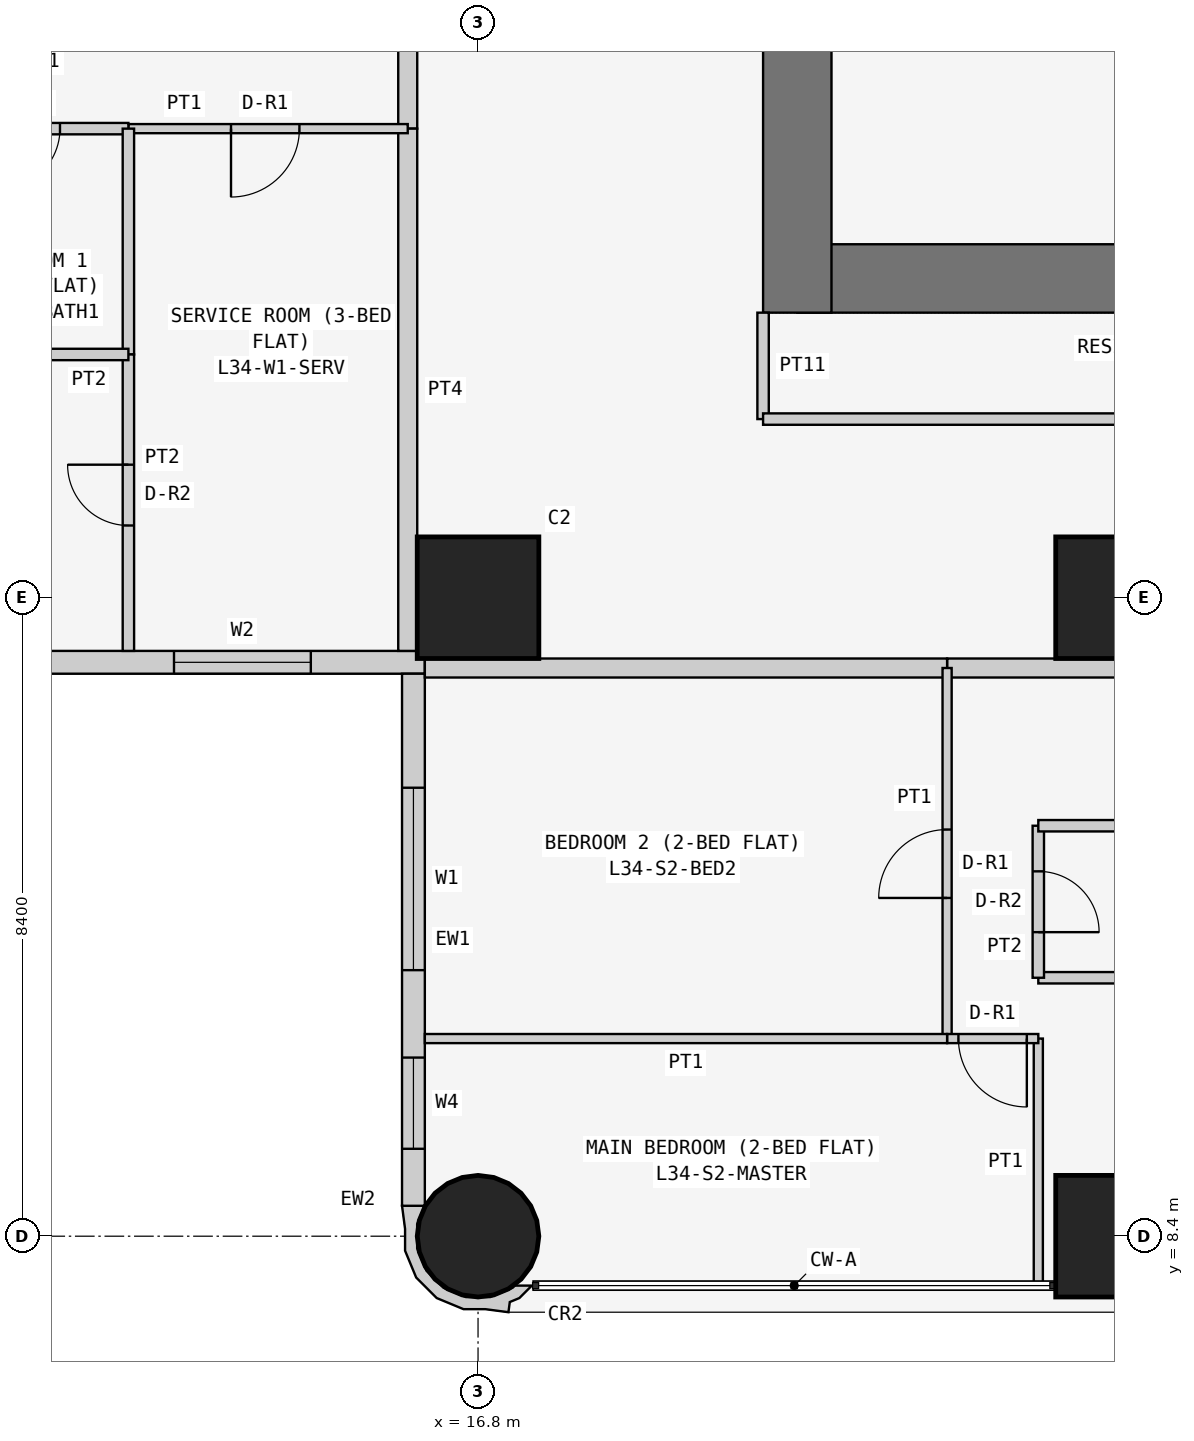
"""IFC4 building model, lengths in metres.
Left out: names, types, materials, properties, quantities, classifications, styles, units other than length and angle.
Written with IfcOpenShell. Run it as: python <this file> out.ifc"""

import sys

from ifc_helpers import new_model, si_unit, direction, frame, frame_2d, origin, origin_2d, place, context, subcontext, project, spatial, polyline, rectangle, circle, outline, extrude, element, fill, save


model = new_model("IFC4")
c1 = context("Model", 3, precision=1e-05, world=origin(), true_north=direction((0.0, 1.0)))
c2 = subcontext(c1, "Body", "Model", "MODEL_VIEW")
j1 = project(units=[si_unit("LENGTHUNIT", "METRE"), si_unit("PLANEANGLEUNIT", "RADIAN")], contexts=[c1])
p1 = place(None, origin())
s1 = spatial("IfcSite", under=j1, at=p1, CompositionType="ELEMENT")
p2 = place(p1, origin())
s2 = spatial("IfcBuilding", under=s1, at=p2, CompositionType="ELEMENT")
p3 = place(p2, frame((0.0, 0.0, 134.1)))
s3 = spatial("IfcBuildingStorey", under=s2, at=p3, CompositionType="ELEMENT", Elevation=134.1)
p4 = place(p3, frame((16.8, 8.4, 0.0), z_axis=(0.0, 0.0, 1.0), x_axis=(1.0, 0.0, 0.0)))
e1 = element("IfcColumn", 1, at=p4, inside=s3, PredefinedType="COLUMN", context=c2, shape_type="SweptSolid", body=[
    extrude(circle(Radius=0.8, at=origin_2d()), origin(), (0.0, 0.0, 1.0), 3.6),
])
for number, where, z_axis, x_axis in (
    (2, (16.8, 16.8, 0.0), (0.0, 0.0, 1.0), (1.0, 0.0, 0.0)),
    (3, (25.2, 8.4, 0.0), (0.0, 0.0, 1.0), (1.0, 0.0, 0.0)),
    (4, (25.2, 16.8, 0.0), (0.0, 0.0, 1.0), (1.0, 0.0, 0.0)),
):
    element("IfcColumn", number, at=place(p3, frame(where, z_axis=z_axis, x_axis=x_axis)), inside=s3, PredefinedType="COLUMN", context=c2, shape_type="SweptSolid", body=[
        extrude(rectangle(XDim=1.6, YDim=1.6, at=origin_2d()), origin(), (0.0, 0.0, 1.0), 3.6),
    ])
p5 = place(p3, frame((21.0, 21.0, 0.0), z_axis=(0.0, 0.0, 1.0), x_axis=(1.0, 0.0, 0.0)))
e5 = element("IfcWall", 5, at=p5, inside=s3, PredefinedType="SHEAR", context=c2, shape_type="SweptSolid", body=[
    extrude(rectangle(XDim=17.25, YDim=0.9, at=frame_2d((8.625, 0.0))), origin(), (0.0, 0.0, 1.0), 3.6),
])
p6 = place(p3, frame((21.0, 37.8, 0.0), z_axis=(0.0, 0.0, 1.0), x_axis=(0.0, -1.0, 0.0)))
e6 = element("IfcWall", 6, at=p6, inside=s3, PredefinedType="SHEAR", context=c2, shape_type="SweptSolid", body=[
    extrude(rectangle(XDim=17.25, YDim=0.9, at=frame_2d((8.625, 0.0))), origin(), (0.0, 0.0, 1.0), 3.6),
])
p7 = place(p6, frame((5.4, 0.0, 0.0)))
e7 = element("IfcOpeningElement", 7, at=p7, cuts=e6, PredefinedType="OPENING", context=c2, shape_type="SweptSolid", body=[
    extrude(rectangle(XDim=1.2, YDim=2.1, at=frame_2d((0.6, 1.05))), frame((0.0, 0.46, 0.0), z_axis=(0.0, -1.0, 0.0), x_axis=(1.0, 0.0, 0.0)), (0.0, 0.0, 1.0), 0.92),
])
p8 = place(p3, frame((0.4, 15.95, 0.0), z_axis=(0.0, 0.0, 1.0), x_axis=(1.0, 0.0, 0.0)))
e8 = element("IfcWall", 8, at=p8, inside=s3, PredefinedType="SOLIDWALL", context=c2, shape_type="SweptSolid", body=[
    extrude(rectangle(XDim=15.7, YDim=0.3, at=frame_2d((7.85, 0.0))), origin(), (0.0, 0.0, 1.0), 3.45),
])
p9 = place(p8, frame((12.4, 0.0, 0.9)))
e9 = element("IfcOpeningElement", 9, at=p9, cuts=e8, PredefinedType="OPENING", context=c2, shape_type="SweptSolid", body=[
    extrude(rectangle(XDim=1.8, YDim=1.5, at=frame_2d((0.9, 0.75))), frame((0.0, 0.16, 0.0), z_axis=(0.0, -1.0, 0.0), x_axis=(1.0, 0.0, 0.0)), (0.0, 0.0, 1.0), 0.32),
])
p10 = place(p8, frame((9.55, 0.0, 1.5)))
e10 = element("IfcOpeningElement", 10, at=p10, cuts=e8, PredefinedType="OPENING", context=c2, shape_type="SweptSolid", body=[
    extrude(rectangle(XDim=0.9, YDim=0.7, at=frame_2d((0.45, 0.35))), frame((0.0, 0.16, 0.0), z_axis=(0.0, -1.0, 0.0), x_axis=(1.0, 0.0, 0.0)), (0.0, 0.0, 1.0), 0.32),
])
p11 = place(p8, frame((5.1, 0.0, 0.9)))
e11 = element("IfcOpeningElement", 11, at=p11, cuts=e8, PredefinedType="OPENING", context=c2, shape_type="SweptSolid", body=[
    extrude(rectangle(XDim=1.8, YDim=1.5, at=frame_2d((0.9, 0.75))), frame((0.0, 0.16, 0.0), z_axis=(0.0, -1.0, 0.0), x_axis=(1.0, 0.0, 0.0)), (0.0, 0.0, 1.0), 0.32),
])
p12 = place(p8, frame((2.0, 0.0, 0.0)))
e12 = element("IfcOpeningElement", 12, at=p12, cuts=e8, PredefinedType="OPENING", context=c2, shape_type="SweptSolid", body=[
    extrude(rectangle(XDim=0.9, YDim=2.4, at=frame_2d((0.45, 1.2))), frame((0.0, 0.16, 0.0), z_axis=(0.0, -1.0, 0.0), x_axis=(1.0, 0.0, 0.0)), (0.0, 0.0, 1.0), 0.32),
])
p13 = place(p8, frame((0.7, 0.0, 0.9)))
e13 = element("IfcOpeningElement", 13, at=p13, cuts=e8, PredefinedType="OPENING", context=c2, shape_type="SweptSolid", body=[
    extrude(rectangle(XDim=1.2, YDim=1.5, at=frame_2d((0.6, 0.75))), frame((0.0, 0.16, 0.0), z_axis=(0.0, -1.0, 0.0), x_axis=(1.0, 0.0, 0.0)), (0.0, 0.0, 1.0), 0.32),
])
p14 = place(p3, frame((15.95, 15.8, 0.0), z_axis=(0.0, 0.0, 1.0), x_axis=(0.0, -1.0, 0.0)))
e14 = element("IfcWall", 14, at=p14, inside=s3, PredefinedType="SOLIDWALL", context=c2, shape_type="SweptSolid", body=[
    extrude(rectangle(XDim=7.0, YDim=0.3, at=frame_2d((3.5, 0.0))), origin(), (0.0, 0.0, 1.0), 3.45),
])
p15 = place(p14, frame((1.5, 0.0, 0.9)))
e15 = element("IfcOpeningElement", 15, at=p15, cuts=e14, PredefinedType="OPENING", context=c2, shape_type="SweptSolid", body=[
    extrude(rectangle(XDim=2.4, YDim=1.5, at=frame_2d((1.2, 0.75))), frame((0.0, 0.16, 0.0), z_axis=(0.0, -1.0, 0.0), x_axis=(1.0, 0.0, 0.0)), (0.0, 0.0, 1.0), 0.32),
])
p16 = place(p14, frame((5.05, 0.0, 0.9)))
e16 = element("IfcOpeningElement", 16, at=p16, cuts=e14, PredefinedType="OPENING", context=c2, shape_type="SweptSolid", body=[
    extrude(rectangle(XDim=1.2, YDim=1.5, at=frame_2d((0.6, 0.75))), frame((0.0, 0.16, 0.0), z_axis=(0.0, -1.0, 0.0), x_axis=(1.0, 0.0, 0.0)), (0.0, 0.0, 1.0), 0.32),
])
p17 = place(p3, frame((15.983, 8.727, 0.0), z_axis=(0.0, 0.0, 1.0), x_axis=(-0.343276641956, -0.93923434088, 0.0)))
e17 = element("IfcWall", 17, at=p17, inside=s3, PredefinedType="SOLIDWALL", context=c2, shape_type="SweptSolid", body=[
    extrude(outline(polyline([(0.829, 1.599), (0.697, 1.569), (0.604, 1.67), (0.394, 1.767), (0.471, 1.556), (0.509, 1.539), (0.724, 1.304), (0.833, 1.005), (0.82, 0.686), (0.686, 0.397), (0.451, 0.182), (0.152, 0.073), (-0.116, 0.084), (-0.127, 0.078), (-0.146, 0.071), (-0.006, -0.197), (0.266, -0.055), (0.535, 0.044), (0.817, 0.302), (0.978, 0.648), (0.994, 1.03), (0.895, 1.3), (0.829, 1.599)])), origin(), (0.0, 0.0, 1.0), 3.45),
])
p18 = place(p3, frame((20.55, 20.55, 0.0), z_axis=(0.0, 0.0, 1.0), x_axis=(0.0, -1.0, 0.0)))
e18 = element("IfcWall", 18, at=p18, inside=s3, PredefinedType="PARTITIONING", context=c2, shape_type="SweptSolid", body=[
    extrude(rectangle(XDim=1.4, YDim=0.15, at=frame_2d((0.7, 0.0))), origin(), (0.0, 0.0, 1.0), 3.45),
])
p19 = place(p3, frame((20.55, 19.15, 0.0), z_axis=(0.0, 0.0, 1.0), x_axis=(1.0, 0.0, 0.0)))
e19 = element("IfcWall", 19, at=p19, inside=s3, PredefinedType="PARTITIONING", context=c2, shape_type="SweptSolid", body=[
    extrude(rectangle(XDim=11.95, YDim=0.15, at=frame_2d((5.975, 0.0))), origin(), (0.0, 0.0, 1.0), 3.45),
])
p20 = place(p19, frame((8.35, 0.0, 0.0)))
e20 = element("IfcOpeningElement", 20, at=p20, cuts=e19, PredefinedType="OPENING", context=c2, shape_type="SweptSolid", body=[
    extrude(rectangle(XDim=1.0, YDim=2.1, at=frame_2d((0.5, 1.05))), frame((0.0, 0.085, 0.0), z_axis=(0.0, -1.0, 0.0), x_axis=(1.0, 0.0, 0.0)), (0.0, 0.0, 1.0), 0.17),
])
p21 = place(p3, frame((29.4, 15.875, 0.0), z_axis=(0.0, 0.0, 1.0), x_axis=(-1.0, 0.0, 0.0)))
e21 = element("IfcWall", 21, at=p21, inside=s3, PredefinedType="PARTITIONING", context=c2, shape_type="SweptSolid", body=[
    extrude(rectangle(XDim=6.429, YDim=0.25, at=frame_2d((3.214, 0.0))), origin(), (0.0, 0.0, 1.0), 3.45),
])
p22 = place(p21, frame((0.5, 0.0, 0.0)))
e22 = element("IfcOpeningElement", 22, at=p22, cuts=e21, PredefinedType="OPENING", context=c2, shape_type="SweptSolid", body=[
    extrude(rectangle(XDim=1.0, YDim=2.1, at=frame_2d((0.5, 1.05))), frame((0.0, 0.135, 0.0), z_axis=(0.0, -1.0, 0.0), x_axis=(1.0, 0.0, 0.0)), (0.0, 0.0, 1.0), 0.27),
])
p23 = place(p3, frame((22.971, 15.875, 0.0), z_axis=(0.0, 0.0, 1.0), x_axis=(-1.0, 0.0, 0.0)))
e23 = element("IfcWall", 23, at=p23, inside=s3, PredefinedType="PARTITIONING", context=c2, shape_type="SweptSolid", body=[
    extrude(rectangle(XDim=6.871, YDim=0.25, at=frame_2d((3.436, 0.0))), origin(), (0.0, 0.0, 1.0), 3.45),
])
p24 = place(p3, frame((15.875, 22.971, 0.0), z_axis=(0.0, 0.0, 1.0), x_axis=(0.0, 1.0, 0.0)))
e24 = element("IfcWall", 24, at=p24, inside=s3, PredefinedType="PARTITIONING", context=c2, shape_type="SweptSolid", body=[
    extrude(rectangle(XDim=1.2, YDim=0.25, at=frame_2d((0.6, 0.0))), origin(), (0.0, 0.0, 1.0), 3.45),
])
p25 = place(p3, frame((15.875, 16.1, 0.0), z_axis=(0.0, 0.0, 1.0), x_axis=(0.0, 1.0, 0.0)))
e25 = element("IfcWall", 25, at=p25, inside=s3, PredefinedType="PARTITIONING", context=c2, shape_type="SweptSolid", body=[
    extrude(rectangle(XDim=6.871, YDim=0.25, at=frame_2d((3.436, 0.0))), origin(), (0.0, 0.0, 1.0), 3.45),
])
p26 = place(p3, frame((29.4, 11.8, 0.0), z_axis=(0.0, 0.0, 1.0), x_axis=(-1.0, 0.0, 0.0)))
e26 = element("IfcWall", 26, at=p26, inside=s3, PredefinedType="PARTITIONING", context=c2, shape_type="SweptSolid", body=[
    extrude(rectangle(XDim=5.229, YDim=0.15, at=frame_2d((2.615, 0.0))), origin(), (0.0, 0.0, 1.0), 3.45),
])
p27 = place(p3, frame((24.171, 11.8, 0.0), z_axis=(0.0, 0.0, 1.0), x_axis=(0.0, 1.0, 0.0)))
e27 = element("IfcWall", 27, at=p27, inside=s3, PredefinedType="PARTITIONING", context=c2, shape_type="SweptSolid", body=[
    extrude(rectangle(XDim=2.0, YDim=0.15, at=frame_2d((1.0, 0.0))), origin(), (0.0, 0.0, 1.0), 3.45),
])
p28 = place(p27, frame((0.6, 0.0, 0.0)))
e28 = element("IfcOpeningElement", 28, at=p28, cuts=e27, PredefinedType="OPENING", context=c2, shape_type="SweptSolid", body=[
    extrude(rectangle(XDim=0.8, YDim=2.1, at=frame_2d((0.4, 1.05))), frame((0.0, 0.085, 0.0), z_axis=(0.0, -1.0, 0.0), x_axis=(1.0, 0.0, 0.0)), (0.0, 0.0, 1.0), 0.17),
])
p29 = place(p3, frame((24.171, 13.8, 0.0), z_axis=(0.0, 0.0, 1.0), x_axis=(1.0, 0.0, 0.0)))
e29 = element("IfcWall", 29, at=p29, inside=s3, PredefinedType="PARTITIONING", context=c2, shape_type="SweptSolid", body=[
    extrude(rectangle(XDim=5.229, YDim=0.15, at=frame_2d((2.615, 0.0))), origin(), (0.0, 0.0, 1.0), 3.45),
])
p30 = place(p3, frame((22.971, 11.0, 0.0), z_axis=(0.0, 0.0, 1.0), x_axis=(0.0, 1.0, 0.0)))
e30 = element("IfcWall", 30, at=p30, inside=s3, PredefinedType="PARTITIONING", context=c2, shape_type="SweptSolid", body=[
    extrude(rectangle(XDim=4.875, YDim=0.12, at=frame_2d((2.438, 0.0))), origin(), (0.0, 0.0, 1.0), 3.45),
])
p31 = place(p30, frame((1.85, 0.0, 0.0)))
e31 = element("IfcOpeningElement", 31, at=p31, cuts=e30, PredefinedType="OPENING", context=c2, shape_type="SweptSolid", body=[
    extrude(rectangle(XDim=0.9, YDim=2.1, at=frame_2d((0.45, 1.05))), frame((0.0, 0.07, 0.0), z_axis=(0.0, -1.0, 0.0), x_axis=(1.0, 0.0, 0.0)), (0.0, 0.0, 1.0), 0.14),
])
p32 = place(p3, frame((24.171, 7.75, 0.0), z_axis=(0.0, 0.0, 1.0), x_axis=(0.0, 1.0, 0.0)))
e32 = element("IfcWall", 32, at=p32, inside=s3, PredefinedType="PARTITIONING", context=c2, shape_type="SweptSolid", body=[
    extrude(rectangle(XDim=3.25, YDim=0.12, at=frame_2d((1.625, 0.0))), origin(), (0.0, 0.0, 1.0), 3.45),
])
p33 = place(p3, frame((24.171, 11.0, 0.0), z_axis=(0.0, 0.0, 1.0), x_axis=(-1.0, 0.0, 0.0)))
e33 = element("IfcWall", 33, at=p33, inside=s3, PredefinedType="PARTITIONING", context=c2, shape_type="SweptSolid", body=[
    extrude(rectangle(XDim=1.2, YDim=0.12, at=frame_2d((0.6, 0.0))), origin(), (0.0, 0.0, 1.0), 3.45),
])
p34 = place(p33, frame((0.151, 0.0, 0.0)))
e34 = element("IfcOpeningElement", 34, at=p34, cuts=e33, PredefinedType="OPENING", context=c2, shape_type="SweptSolid", body=[
    extrude(rectangle(XDim=0.9, YDim=2.1, at=frame_2d((0.45, 1.05))), frame((0.0, 0.07, 0.0), z_axis=(0.0, -1.0, 0.0), x_axis=(1.0, 0.0, 0.0)), (0.0, 0.0, 1.0), 0.14),
])
p35 = place(p3, frame((22.971, 11.0, 0.0), z_axis=(0.0, 0.0, 1.0), x_axis=(-1.0, 0.0, 0.0)))
e35 = element("IfcWall", 35, at=p35, inside=s3, PredefinedType="PARTITIONING", context=c2, shape_type="SweptSolid", body=[
    extrude(rectangle(XDim=6.871, YDim=0.12, at=frame_2d((3.436, 0.0))), origin(), (0.0, 0.0, 1.0), 3.45),
])
p36 = place(p3, frame((12.2, 22.971, 0.0), z_axis=(0.0, 0.0, 1.0), x_axis=(1.0, 0.0, 0.0)))
e36 = element("IfcWall", 36, at=p36, inside=s3, PredefinedType="PARTITIONING", context=c2, shape_type="SweptSolid", body=[
    extrude(rectangle(XDim=3.675, YDim=0.12, at=frame_2d((1.837, 0.0))), origin(), (0.0, 0.0, 1.0), 3.45),
])
p37 = place(p36, frame((1.35, 0.0, 0.0)))
e37 = element("IfcOpeningElement", 37, at=p37, cuts=e36, PredefinedType="OPENING", context=c2, shape_type="SweptSolid", body=[
    extrude(rectangle(XDim=0.9, YDim=2.1, at=frame_2d((0.45, 1.05))), frame((0.0, 0.07, 0.0), z_axis=(0.0, -1.0, 0.0), x_axis=(1.0, 0.0, 0.0)), (0.0, 0.0, 1.0), 0.14),
])
p38 = place(p3, frame((9.6, 22.971, 0.0), z_axis=(0.0, 0.0, 1.0), x_axis=(1.0, 0.0, 0.0)))
e38 = element("IfcWall", 38, at=p38, inside=s3, PredefinedType="PARTITIONING", context=c2, shape_type="SweptSolid", body=[
    extrude(rectangle(XDim=2.6, YDim=0.15, at=frame_2d((1.3, 0.0))), origin(), (0.0, 0.0, 1.0), 3.45),
])
p39 = place(p38, frame((0.9, 0.0, 0.0)))
e39 = element("IfcOpeningElement", 39, at=p39, cuts=e38, PredefinedType="OPENING", context=c2, shape_type="SweptSolid", body=[
    extrude(rectangle(XDim=0.8, YDim=2.1, at=frame_2d((0.4, 1.05))), frame((0.0, 0.085, 0.0), z_axis=(0.0, -1.0, 0.0), x_axis=(1.0, 0.0, 0.0)), (0.0, 0.0, 1.0), 0.17),
])
p40 = place(p3, frame((12.2, 22.971, 0.0), z_axis=(0.0, 0.0, 1.0), x_axis=(0.0, -1.0, 0.0)))
e40 = element("IfcWall", 40, at=p40, inside=s3, PredefinedType="PARTITIONING", context=c2, shape_type="SweptSolid", body=[
    extrude(rectangle(XDim=2.971, YDim=0.15, at=frame_2d((1.485, 0.0))), origin(), (0.0, 0.0, 1.0), 3.45),
])
p41 = place(p3, frame((12.2, 20.0, 0.0), z_axis=(0.0, 0.0, 1.0), x_axis=(0.0, -1.0, 0.0)))
e41 = element("IfcWall", 41, at=p41, inside=s3, PredefinedType="PARTITIONING", context=c2, shape_type="SweptSolid", body=[
    extrude(rectangle(XDim=3.9, YDim=0.15, at=frame_2d((1.95, 0.0))), origin(), (0.0, 0.0, 1.0), 3.45),
])
p42 = place(p41, frame((1.45, 0.0, 0.0)))
e42 = element("IfcOpeningElement", 42, at=p42, cuts=e41, PredefinedType="OPENING", context=c2, shape_type="SweptSolid", body=[
    extrude(rectangle(XDim=0.8, YDim=2.1, at=frame_2d((0.4, 1.05))), frame((0.0, 0.085, 0.0), z_axis=(0.0, -1.0, 0.0), x_axis=(1.0, 0.0, 0.0)), (0.0, 0.0, 1.0), 0.17),
])
p43 = place(p3, frame((9.6, 20.0, 0.0), z_axis=(0.0, 0.0, 1.0), x_axis=(1.0, 0.0, 0.0)))
e43 = element("IfcWall", 43, at=p43, inside=s3, PredefinedType="PARTITIONING", context=c2, shape_type="SweptSolid", body=[
    extrude(rectangle(XDim=2.6, YDim=0.15, at=frame_2d((1.3, 0.0))), origin(), (0.0, 0.0, 1.0), 3.45),
])
p44 = place(p15, origin())
e44 = element("IfcWindow", 44, at=p44, inside=s3, PartitioningType="SINGLE_PANEL", PredefinedType="WINDOW", context=c2, shape_type="SweptSolid", body=[
    extrude(rectangle(XDim=2.4, YDim=1.5, at=frame_2d((1.2, 0.75))), frame((0.0, 0.03, 0.0), z_axis=(0.0, -1.0, 0.0), x_axis=(1.0, 0.0, 0.0)), (0.0, 0.0, 1.0), 0.06),
])
fill(e15, e44)
p45 = place(p16, origin())
e45 = element("IfcWindow", 45, at=p45, inside=s3, PartitioningType="SINGLE_PANEL", PredefinedType="WINDOW", context=c2, shape_type="SweptSolid", body=[
    extrude(rectangle(XDim=1.2, YDim=1.5, at=frame_2d((0.6, 0.75))), frame((0.0, 0.03, 0.0), z_axis=(0.0, -1.0, 0.0), x_axis=(1.0, 0.0, 0.0)), (0.0, 0.0, 1.0), 0.06),
])
fill(e16, e45)
p46 = place(p9, origin())
e46 = element("IfcWindow", 46, at=p46, inside=s3, PartitioningType="SINGLE_PANEL", PredefinedType="WINDOW", context=c2, shape_type="SweptSolid", body=[
    extrude(rectangle(XDim=1.8, YDim=1.5, at=frame_2d((0.9, 0.75))), frame((0.0, 0.03, 0.0), z_axis=(0.0, -1.0, 0.0), x_axis=(1.0, 0.0, 0.0)), (0.0, 0.0, 1.0), 0.06),
])
fill(e9, e46)
p47 = place(p28, frame((0.8, 0.0, 0.0), z_axis=(0.0, 0.0, 1.0), x_axis=(-1.0, 0.0, 0.0)))
e47 = element("IfcDoor", 47, at=p47, inside=s3, OperationType="SINGLE_SWING_RIGHT", PredefinedType="DOOR", context=c2, shape_type="SweptSolid", body=[
    extrude(rectangle(XDim=0.8, YDim=2.1, at=frame_2d((0.4, 1.05))), frame((0.0, 0.025, 0.0), z_axis=(0.0, -1.0, 0.0), x_axis=(1.0, 0.0, 0.0)), (0.0, 0.0, 1.0), 0.05),
])
fill(e28, e47)
p48 = place(p31, origin())
e48 = element("IfcDoor", 48, at=p48, inside=s3, OperationType="SINGLE_SWING_LEFT", PredefinedType="DOOR", context=c2, shape_type="SweptSolid", body=[
    extrude(rectangle(XDim=0.9, YDim=2.1, at=frame_2d((0.45, 1.05))), frame((0.0, 0.025, 0.0), z_axis=(0.0, -1.0, 0.0), x_axis=(1.0, 0.0, 0.0)), (0.0, 0.0, 1.0), 0.05),
])
fill(e31, e48)
p49 = place(p34, origin())
e49 = element("IfcDoor", 49, at=p49, inside=s3, OperationType="SINGLE_SWING_LEFT", PredefinedType="DOOR", context=c2, shape_type="SweptSolid", body=[
    extrude(rectangle(XDim=0.9, YDim=2.1, at=frame_2d((0.45, 1.05))), frame((0.0, 0.025, 0.0), z_axis=(0.0, -1.0, 0.0), x_axis=(1.0, 0.0, 0.0)), (0.0, 0.0, 1.0), 0.05),
])
fill(e34, e49)
p50 = place(p37, frame((0.9, 0.0, 0.0), z_axis=(0.0, 0.0, 1.0), x_axis=(-1.0, 0.0, 0.0)))
e50 = element("IfcDoor", 50, at=p50, inside=s3, OperationType="SINGLE_SWING_RIGHT", PredefinedType="DOOR", context=c2, shape_type="SweptSolid", body=[
    extrude(rectangle(XDim=0.9, YDim=2.1, at=frame_2d((0.45, 1.05))), frame((0.0, 0.025, 0.0), z_axis=(0.0, -1.0, 0.0), x_axis=(1.0, 0.0, 0.0)), (0.0, 0.0, 1.0), 0.05),
])
fill(e37, e50)
p51 = place(p42, frame((0.8, 0.0, 0.0), z_axis=(0.0, 0.0, 1.0), x_axis=(-1.0, 0.0, 0.0)))
e51 = element("IfcDoor", 51, at=p51, inside=s3, OperationType="SINGLE_SWING_RIGHT", PredefinedType="DOOR", context=c2, shape_type="SweptSolid", body=[
    extrude(rectangle(XDim=0.8, YDim=2.1, at=frame_2d((0.4, 1.05))), frame((0.0, 0.025, 0.0), z_axis=(0.0, -1.0, 0.0), x_axis=(1.0, 0.0, 0.0)), (0.0, 0.0, 1.0), 0.05),
])
fill(e42, e51)
p52 = place(p39, frame((0.8, 0.0, 0.0), z_axis=(0.0, 0.0, 1.0), x_axis=(-1.0, 0.0, 0.0)))
e52 = element("IfcDoor", 52, at=p52, inside=s3, OperationType="SINGLE_SWING_RIGHT", PredefinedType="DOOR", context=c2, shape_type="SweptSolid", body=[
    extrude(rectangle(XDim=0.8, YDim=2.1, at=frame_2d((0.4, 1.05))), frame((0.0, 0.025, 0.0), z_axis=(0.0, -1.0, 0.0), x_axis=(1.0, 0.0, 0.0)), (0.0, 0.0, 1.0), 0.05),
])
fill(e39, e52)
save(model, sys.argv[1])
